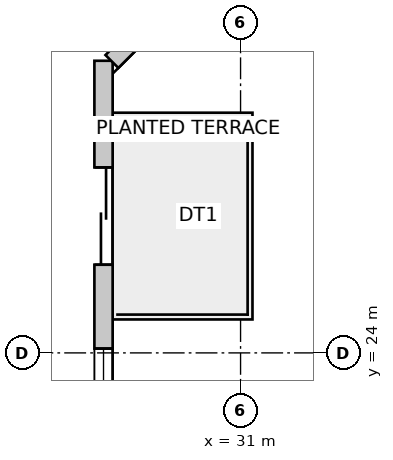
"""IFC4 building model, lengths in metres.
Left out: names, types, materials, properties, quantities, classifications, styles, units other than length and angle.
Written with IfcOpenShell. Run it as: python <this file> out.ifc"""

import sys

from ifc_helpers import new_model, si_unit, direction, frame, frame_2d, origin, place, context, subcontext, project, spatial, rectangle, extrude, source, transform, mapped, element, fill, save


model = new_model("IFC4")
c1 = context("Model", 3, precision=1e-05, world=origin(), true_north=direction((0.0, 1.0)))
c2 = subcontext(c1, "Body", "Model", "MODEL_VIEW")
j1 = project(units=[si_unit("LENGTHUNIT", "METRE"), si_unit("PLANEANGLEUNIT", "RADIAN")], contexts=[c1])
p1 = place(None, origin())
s1 = spatial("IfcSite", under=j1, at=p1, CompositionType="ELEMENT")
p2 = place(p1, origin())
s2 = spatial("IfcBuilding", under=s1, at=p2, CompositionType="ELEMENT")
p3 = place(p2, frame((0.0, 0.0, 105.4)))
s3 = spatial("IfcBuildingStorey", under=s2, at=p3, CompositionType="ELEMENT", Elevation=105.4)
p4 = place(p3, frame((28.746, 11.057, 0.0), z_axis=(0.0, 0.0, 1.0), x_axis=(0.0, 1.0, 0.0)))
e1 = element("IfcWall", 1, at=p4, inside=s3, PredefinedType="SOLIDWALL", context=c2, shape_type="SweptSolid", body=[
    extrude(rectangle(XDim=17.747, YDim=0.3, at=frame_2d((8.874, 0.0))), origin(), (0.0, 0.0, 1.0), 4.95),
])
m1 = source(origin(), c2, "Body", "SweptSolid", [
    extrude(rectangle(XDim=1.6, YDim=2.15, at=frame_2d((0.8, 1.075))), frame((0.0, 0.16, 0.0), z_axis=(0.0, -1.0, 0.0), x_axis=(1.0, 0.0, 0.0)), (0.0, 0.0, 1.0), 0.32),
])
p5 = place(p4, frame((14.393, 0.0, 0.0)))
e2 = element("IfcOpeningElement", 2, at=p5, cuts=e1, PredefinedType="OPENING", context=c2, shape_type="MappedRepresentation", body=[
    mapped(m1, transform((0.0, 0.0, 0.0), scale=1.0)),
])
m2 = source(origin(), c2, "Body", "SweptSolid", [
    extrude(rectangle(XDim=2.4, YDim=2.2, at=frame_2d((1.2, 1.1))), frame((0.0, 0.16, 0.0), z_axis=(0.0, -1.0, 0.0), x_axis=(1.0, 0.0, 0.0)), (0.0, 0.0, 1.0), 0.32),
])
p6 = place(p4, frame((1.419, 0.0, 0.85)))
e3 = element("IfcOpeningElement", 3, at=p6, cuts=e1, PredefinedType="OPENING", context=c2, shape_type="MappedRepresentation", body=[
    mapped(m2, transform((0.0, 0.0, 0.0), scale=1.0)),
])
m3 = source(origin(), c2, "Body", "SweptSolid", [
    extrude(rectangle(XDim=2.8, YDim=2.4, at=frame_2d((1.4, 1.2))), frame((0.0, 0.16, 0.0), z_axis=(0.0, -1.0, 0.0), x_axis=(1.0, 0.0, 0.0)), (0.0, 0.0, 1.0), 0.32),
])
p7 = place(p4, frame((5.817, 0.0, 0.85)))
e4 = element("IfcOpeningElement", 4, at=p7, cuts=e1, PredefinedType="OPENING", context=c2, shape_type="MappedRepresentation", body=[
    mapped(m3, transform((0.0, 0.0, 0.0), scale=1.0)),
])
p8 = place(p4, frame((10.614, 0.0, 0.85)))
e5 = element("IfcOpeningElement", 5, at=p8, cuts=e1, PredefinedType="OPENING", context=c2, shape_type="MappedRepresentation", body=[
    mapped(m2, transform((0.0, 0.0, 0.0), scale=1.0)),
])
p9 = place(p3, frame((28.884, 28.792, 0.0), z_axis=(0.0, 0.0, 1.0), x_axis=(0.707064797706, 0.707148762175, 0.0)))
e6 = element("IfcWall", 6, at=p9, inside=s3, PredefinedType="SOLIDWALL", context=c2, shape_type="SweptSolid", body=[
    extrude(rectangle(XDim=2.908, YDim=0.3, at=frame_2d((1.454, 0.0))), origin(), (0.0, 0.0, 1.0), 4.95),
])
m4 = source(origin(), c2, "Body", "SweptSolid", [
    extrude(rectangle(XDim=2.1, YDim=2.0, at=frame_2d((1.05, 1.0))), frame((0.0, 0.16, 0.0), z_axis=(0.0, -1.0, 0.0), x_axis=(1.0, 0.0, 0.0)), (0.0, 0.0, 1.0), 0.32),
])
p10 = place(p9, frame((0.404, 0.0, 0.85)))
e7 = element("IfcOpeningElement", 7, at=p10, cuts=e6, PredefinedType="OPENING", context=c2, shape_type="MappedRepresentation", body=[
    mapped(m4, transform((0.0, 0.0, 0.0), scale=1.0)),
])
m5 = source(origin(), c2, "Body", "SweptSolid", [
    extrude(rectangle(XDim=1.6, YDim=2.15, at=frame_2d((0.8, 1.075))), frame((0.0, 0.025, 0.0), z_axis=(0.0, -1.0, 0.0), x_axis=(1.0, 0.0, 0.0)), (0.0, 0.0, 1.0), 0.05),
])
p11 = place(p5, origin())
e8 = element("IfcDoor", 8, at=p11, inside=s3, OperationType="DOUBLE_DOOR_SLIDING", PredefinedType="DOOR", context=c2, shape_type="MappedRepresentation", body=[
    mapped(m5, transform((0.0, 0.0, 0.0), scale=1.0)),
])
fill(e2, e8)
m6 = source(origin(), c2, "Body", "SweptSolid", [
    extrude(rectangle(XDim=2.4, YDim=2.2, at=frame_2d((1.2, 1.1))), frame((0.0, -0.015, 0.0), z_axis=(0.0, -1.0, 0.0), x_axis=(1.0, 0.0, 0.0)), (0.0, 0.0, 1.0), 0.06),
])
p12 = place(p8, origin())
e9 = element("IfcWindow", 9, at=p12, inside=s3, PartitioningType="SINGLE_PANEL", PredefinedType="WINDOW", context=c2, shape_type="MappedRepresentation", body=[
    mapped(m6, transform((0.0, 0.0, 0.0), scale=1.0)),
])
fill(e5, e9)
save(model, sys.argv[1])
